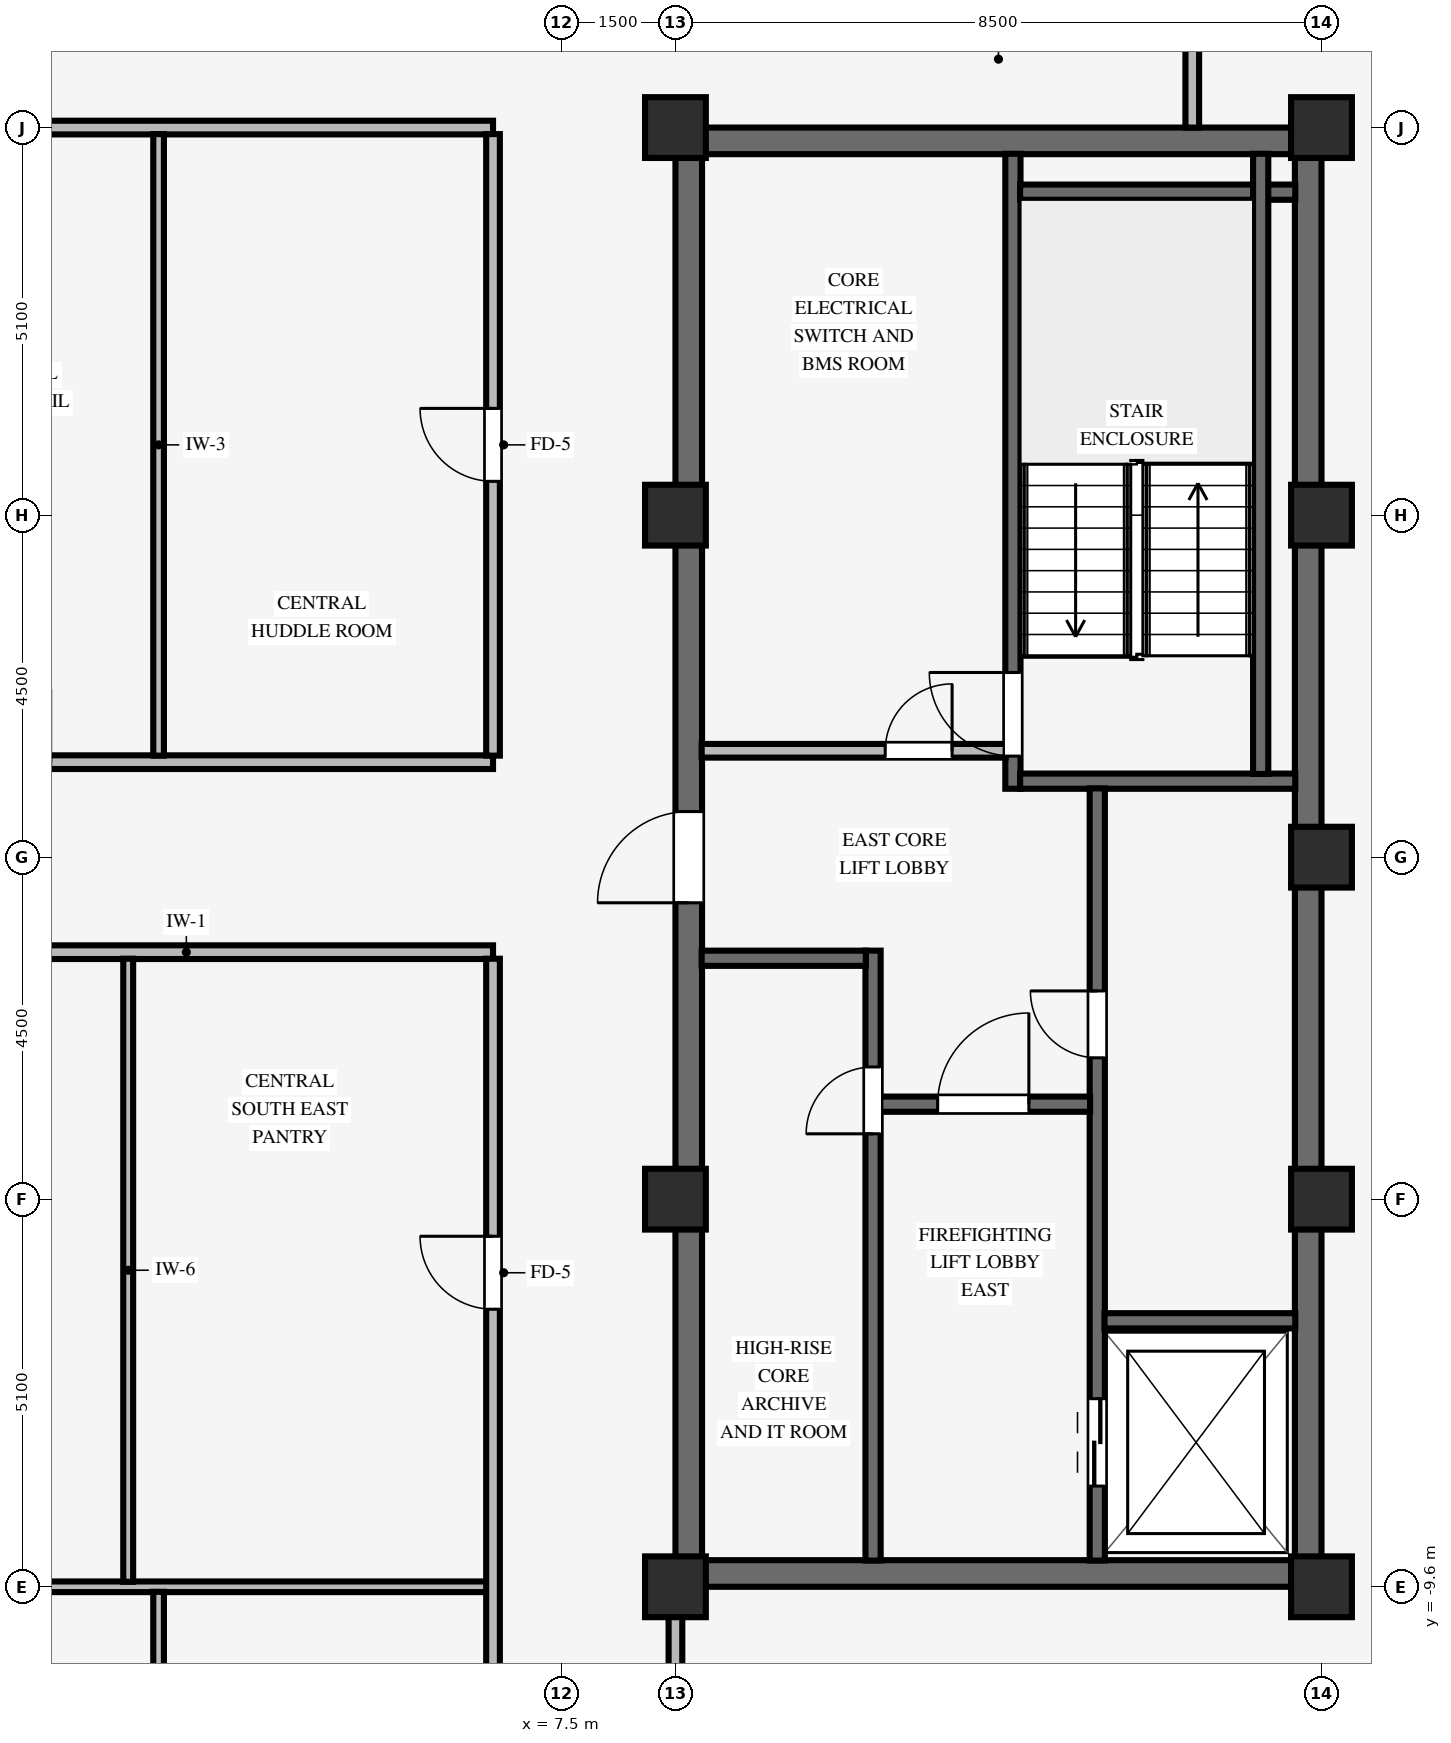
"""IFC4 building model, lengths in metres.
Left out: names, types, materials, properties, quantities, classifications, styles, units other than length and angle.
Written with IfcOpenShell. Run it as: python <this file> out.ifc"""

import sys

from ifc_helpers import new_model, si_unit, direction, frame, frame_2d, origin, origin_2d, place, context, subcontext, project, spatial, rectangle, extrude, source, transform, mapped, element, fill, save


model = new_model("IFC4")
c1 = context("Model", 3, precision=1e-05, world=origin(), true_north=direction((0.0, 1.0)))
c2 = subcontext(c1, "Body", "Model", "MODEL_VIEW")
j1 = project(units=[si_unit("LENGTHUNIT", "METRE"), si_unit("PLANEANGLEUNIT", "RADIAN")], contexts=[c1])
p1 = place(None, origin())
s1 = spatial("IfcSite", under=j1, at=p1, CompositionType="ELEMENT")
p2 = place(p1, origin())
s2 = spatial("IfcBuilding", under=s1, at=p2, CompositionType="ELEMENT")
p3 = place(p2, frame((0.0, 0.0, 268.9)))
s3 = spatial("IfcBuildingStorey", under=s2, at=p3, CompositionType="ELEMENT", Elevation=268.9)
for number, where, z_axis, x_axis in (
    (1, (9.0, -9.425, 0.0), (0.0, 0.0, 1.0), (1.0, 0.0, 0.0)),
    (2, (9.0, 9.425, 0.0), (0.0, 0.0, 1.0), (1.0, 0.0, 0.0)),
):
    element("IfcWall", number, at=place(p3, frame(where, z_axis=z_axis, x_axis=x_axis)), inside=s3, PredefinedType="SHEAR", context=c2, shape_type="SweptSolid", body=[
        extrude(rectangle(XDim=8.5, YDim=0.35, at=frame_2d((4.25, 0.0))), origin(), (0.0, 0.0, 1.0), 3.37),
    ])
p4 = place(p3, frame((9.175, -9.255, 0.0), z_axis=(0.0, 0.0, 1.0), x_axis=(0.0, 1.0, 0.0)))
e3 = element("IfcWall", 3, at=p4, inside=s3, PredefinedType="SHEAR", context=c2, shape_type="SweptSolid", body=[
    extrude(rectangle(XDim=18.51, YDim=0.35, at=frame_2d((9.255, 0.0))), origin(), (0.0, 0.0, 1.0), 3.37),
])
p5 = place(p4, frame((8.655, 0.0, 0.0)))
e4 = element("IfcOpeningElement", 4, at=p5, cuts=e3, PredefinedType="OPENING", context=c2, shape_type="SweptSolid", body=[
    extrude(rectangle(XDim=1.2, YDim=2.15, at=frame_2d((0.6, 1.075))), frame((0.0, 0.185, 0.0), z_axis=(0.0, -1.0, 0.0), x_axis=(1.0, 0.0, 0.0)), (0.0, 0.0, 1.0), 0.37),
])
p6 = place(p3, frame((17.325, -9.255, 0.0), z_axis=(0.0, 0.0, 1.0), x_axis=(0.0, 1.0, 0.0)))
e5 = element("IfcWall", 5, at=p6, inside=s3, PredefinedType="SHEAR", context=c2, shape_type="SweptSolid", body=[
    extrude(rectangle(XDim=18.51, YDim=0.35, at=frame_2d((9.255, 0.0))), origin(), (0.0, 0.0, 1.0), 3.37),
])
for number, where, z_axis, x_axis in (
    (6, (9.0, -9.6, 0.0), (0.0, 0.0, 1.0), (1.0, 0.0, 0.0)),
    (7, (9.0, -4.5, 0.0), (0.0, 0.0, 1.0), (1.0, 0.0, 0.0)),
    (8, (9.0, 4.5, 0.0), (0.0, 0.0, 1.0), (1.0, 0.0, 0.0)),
    (9, (9.0, 9.6, 0.0), (0.0, 0.0, 1.0), (1.0, 0.0, 0.0)),
    (10, (17.5, -9.6, 0.0), (0.0, 0.0, 1.0), (1.0, 0.0, 0.0)),
    (11, (17.5, -4.5, 0.0), (0.0, 0.0, 1.0), (1.0, 0.0, 0.0)),
    (12, (17.5, 4.5, 0.0), (0.0, 0.0, 1.0), (1.0, 0.0, 0.0)),
    (13, (17.5, 9.6, 0.0), (0.0, 0.0, 1.0), (1.0, 0.0, 0.0)),
    (14, (17.5, 0.0, 0.0), (0.0, 0.0, 1.0), (1.0, 0.0, 0.0)),
):
    element("IfcColumn", number, at=place(p3, frame(where, z_axis=z_axis, x_axis=x_axis)), inside=s3, PredefinedType="COLUMN", context=c2, shape_type="SweptSolid", body=[
        extrude(rectangle(XDim=0.8, YDim=0.8, at=origin_2d()), origin(), (0.0, 0.0, 1.0), 3.37),
    ])
p7 = place(p3, frame((13.44, 0.9, 0.0), z_axis=(0.0, 0.0, 1.0), x_axis=(0.0, 1.0, 0.0)))
e15 = element("IfcWall", 15, at=p7, inside=s3, PredefinedType="SHEAR", context=c2, shape_type="SweptSolid", body=[
    extrude(rectangle(XDim=8.355, YDim=0.2, at=frame_2d((4.177, 0.0))), origin(), (0.0, 0.0, 1.0), 3.37),
])
p8 = place(p7, frame((0.43, 0.0, 0.0)))
e16 = element("IfcOpeningElement", 16, at=p8, cuts=e15, PredefinedType="OPENING", context=c2, shape_type="SweptSolid", body=[
    extrude(rectangle(XDim=1.1, YDim=2.15, at=frame_2d((0.55, 1.075))), frame((0.0, 0.11, 0.0), z_axis=(0.0, -1.0, 0.0), x_axis=(1.0, 0.0, 0.0)), (0.0, 0.0, 1.0), 0.22),
])
for number, where, z_axis, x_axis in (
    (17, (13.535, 1.0, 0.0), (0.0, 0.0, 1.0), (1.0, 0.0, 0.0)),
    (18, (13.535, 8.75, 0.0), (0.0, 0.0, 1.0), (1.0, 0.0, 0.0)),
):
    element("IfcWall", number, at=place(p3, frame(where, z_axis=z_axis, x_axis=x_axis)), inside=s3, PredefinedType="SHEAR", context=c2, shape_type="SweptSolid", body=[
        extrude(rectangle(XDim=3.62, YDim=0.2, at=frame_2d((1.81, 0.0))), origin(), (0.0, 0.0, 1.0), 3.37),
    ])
p9 = place(p3, frame((16.7, 1.095, 0.0), z_axis=(0.0, 0.0, 1.0), x_axis=(0.0, 1.0, 0.0)))
e19 = element("IfcWall", 19, at=p9, inside=s3, PredefinedType="SHEAR", context=c2, shape_type="SweptSolid", body=[
    extrude(rectangle(XDim=8.16, YDim=0.2, at=frame_2d((4.08, 0.0))), origin(), (0.0, 0.0, 1.0), 3.37),
])
p10 = place(p3, frame((14.55, -9.255, 0.0), z_axis=(0.0, 0.0, 1.0), x_axis=(0.0, 1.0, 0.0)))
e20 = element("IfcWall", 20, at=p10, inside=s3, PredefinedType="SHEAR", context=c2, shape_type="SweptSolid", body=[
    extrude(rectangle(XDim=10.16, YDim=0.2, at=frame_2d((5.08, 0.0))), origin(), (0.0, 0.0, 1.0), 3.37),
])
p11 = place(p10, frame((6.615, 0.0, 0.0)))
e21 = element("IfcOpeningElement", 21, at=p11, cuts=e20, PredefinedType="OPENING", context=c2, shape_type="SweptSolid", body=[
    extrude(rectangle(XDim=0.88, YDim=2.1, at=frame_2d((0.44, 1.05))), frame((0.0, 0.11, 0.0), z_axis=(0.0, -1.0, 0.0), x_axis=(1.0, 0.0, 0.0)), (0.0, 0.0, 1.0), 0.22),
])
p12 = place(p10, frame((0.98, 0.0, 0.0)))
e22 = element("IfcOpeningElement", 22, at=p12, cuts=e20, PredefinedType="OPENING", context=c2, shape_type="SweptSolid", body=[
    extrude(rectangle(XDim=1.15, YDim=2.15, at=frame_2d((0.575, 1.075))), frame((0.0, 0.11, 0.0), z_axis=(0.0, -1.0, 0.0), x_axis=(1.0, 0.0, 0.0)), (0.0, 0.0, 1.0), 0.22),
])
p13 = place(p3, frame((14.645, -6.1, 0.0), z_axis=(0.0, 0.0, 1.0), x_axis=(1.0, 0.0, 0.0)))
e23 = element("IfcWall", 23, at=p13, inside=s3, PredefinedType="SHEAR", context=c2, shape_type="SweptSolid", body=[
    extrude(rectangle(XDim=2.51, YDim=0.2, at=frame_2d((1.255, 0.0))), origin(), (0.0, 0.0, 1.0), 3.37),
])
p14 = place(p3, frame((11.6, -9.255, 0.0), z_axis=(0.0, 0.0, 1.0), x_axis=(0.0, 1.0, 0.0)))
e24 = element("IfcWall", 24, at=p14, inside=s3, PredefinedType="SHEAR", context=c2, shape_type="SweptSolid", body=[
    extrude(rectangle(XDim=8.025, YDim=0.2, at=frame_2d((4.012, 0.0))), origin(), (0.0, 0.0, 1.0), 3.37),
])
p15 = place(p14, frame((5.615, 0.0, 0.0)))
e25 = element("IfcOpeningElement", 25, at=p15, cuts=e24, PredefinedType="OPENING", context=c2, shape_type="SweptSolid", body=[
    extrude(rectangle(XDim=0.88, YDim=2.1, at=frame_2d((0.44, 1.05))), frame((0.0, 0.11, 0.0), z_axis=(0.0, -1.0, 0.0), x_axis=(1.0, 0.0, 0.0)), (0.0, 0.0, 1.0), 0.22),
])
p16 = place(p3, frame((11.695, -3.25, 0.0), z_axis=(0.0, 0.0, 1.0), x_axis=(1.0, 0.0, 0.0)))
e26 = element("IfcWall", 26, at=p16, inside=s3, PredefinedType="SHEAR", context=c2, shape_type="SweptSolid", body=[
    extrude(rectangle(XDim=2.76, YDim=0.2, at=frame_2d((1.38, 0.0))), origin(), (0.0, 0.0, 1.0), 3.37),
])
p17 = place(p16, frame((0.755, 0.0, 0.0)))
e27 = element("IfcOpeningElement", 27, at=p17, cuts=e26, PredefinedType="OPENING", context=c2, shape_type="SweptSolid", body=[
    extrude(rectangle(XDim=1.2, YDim=2.15, at=frame_2d((0.6, 1.075))), frame((0.0, 0.11, 0.0), z_axis=(0.0, -1.0, 0.0), x_axis=(1.0, 0.0, 0.0)), (0.0, 0.0, 1.0), 0.22),
])
p18 = place(p3, frame((9.345, -1.33, 0.0), z_axis=(0.0, 0.0, 1.0), x_axis=(1.0, 0.0, 0.0)))
e28 = element("IfcWall", 28, at=p18, inside=s3, PredefinedType="SHEAR", context=c2, shape_type="SweptSolid", body=[
    extrude(rectangle(XDim=2.16, YDim=0.2, at=frame_2d((1.08, 0.0))), origin(), (0.0, 0.0, 1.0), 3.37),
])
p19 = place(p3, frame((9.345, 1.4, 0.0), z_axis=(0.0, 0.0, 1.0), x_axis=(1.0, 0.0, 0.0)))
e29 = element("IfcWall", 29, at=p19, inside=s3, PredefinedType="PARTITIONING", context=c2, shape_type="SweptSolid", body=[
    extrude(rectangle(XDim=4.0, YDim=0.18, at=frame_2d((2.0, 0.0))), origin(), (0.0, 0.0, 1.0), 3.36),
])
p20 = place(p19, frame((2.415, 0.0, 0.0)))
e30 = element("IfcOpeningElement", 30, at=p20, cuts=e29, PredefinedType="OPENING", context=c2, shape_type="SweptSolid", body=[
    extrude(rectangle(XDim=0.88, YDim=2.1, at=frame_2d((0.44, 1.05))), frame((0.0, 0.1, 0.0), z_axis=(0.0, -1.0, 0.0), x_axis=(1.0, 0.0, 0.0)), (0.0, 0.0, 1.0), 0.2),
])
p21 = place(p3, frame((0.151, -9.6, 0.0), z_axis=(0.0, 0.0, 1.0), x_axis=(1.0, 0.0, 0.0)))
e31 = element("IfcWall", 31, at=p21, inside=s3, PredefinedType="PARTITIONING", context=c2, shape_type="SweptSolid", body=[
    extrude(rectangle(XDim=6.388, YDim=0.14, at=frame_2d((3.194, 0.0))), origin(), (0.0, 0.0, 1.0), 2.405),
])
p22 = place(p3, frame((-6.6, -1.25, 0.0), z_axis=(0.0, 0.0, 1.0), x_axis=(1.0, 0.0, 0.0)))
e32 = element("IfcWall", 32, at=p22, inside=s3, PredefinedType="PARTITIONING", context=c2, shape_type="SweptSolid", body=[
    extrude(rectangle(XDim=13.2, YDim=0.18, at=frame_2d((6.6, 0.0))), origin(), (0.0, 0.0, 1.0), 3.36),
])
p23 = place(p22, frame((3.72, 0.0, 0.0)))
e33 = element("IfcOpeningElement", 33, at=p23, cuts=e32, PredefinedType="OPENING", context=c2, shape_type="SweptSolid", body=[
    extrude(rectangle(XDim=0.96, YDim=2.1, at=frame_2d((0.48, 1.05))), frame((0.0, 0.1, 0.0), z_axis=(0.0, -1.0, 0.0), x_axis=(1.0, 0.0, 0.0)), (0.0, 0.0, 1.0), 0.2),
])
p24 = place(p3, frame((-6.6, 1.25, 0.0), z_axis=(0.0, 0.0, 1.0), x_axis=(1.0, 0.0, 0.0)))
e34 = element("IfcWall", 34, at=p24, inside=s3, PredefinedType="PARTITIONING", context=c2, shape_type="SweptSolid", body=[
    extrude(rectangle(XDim=13.2, YDim=0.18, at=frame_2d((6.6, 0.0))), origin(), (0.0, 0.0, 1.0), 3.36),
])
p25 = place(p24, frame((6.42, 0.0, 0.0)))
e35 = element("IfcOpeningElement", 35, at=p25, cuts=e34, PredefinedType="OPENING", context=c2, shape_type="SweptSolid", body=[
    extrude(rectangle(XDim=0.96, YDim=2.1, at=frame_2d((0.48, 1.05))), frame((0.0, 0.1, 0.0), z_axis=(0.0, -1.0, 0.0), x_axis=(1.0, 0.0, 0.0)), (0.0, 0.0, 1.0), 0.2),
])
p26 = place(p3, frame((0.151, 9.6, 0.0), z_axis=(0.0, 0.0, 1.0), x_axis=(1.0, 0.0, 0.0)))
e36 = element("IfcWall", 36, at=p26, inside=s3, PredefinedType="PARTITIONING", context=c2, shape_type="SweptSolid", body=[
    extrude(rectangle(XDim=6.449, YDim=0.18, at=frame_2d((3.225, 0.0))), origin(), (0.0, 0.0, 1.0), 2.405),
])
p27 = place(p3, frame((1.8, -9.534, 0.0), z_axis=(0.0, 0.0, 1.0), x_axis=(0.0, 1.0, 0.0)))
e37 = element("IfcWall", 37, at=p27, inside=s3, PredefinedType="PARTITIONING", context=c2, shape_type="SweptSolid", body=[
    extrude(rectangle(XDim=8.198, YDim=0.13, at=frame_2d((4.099, 0.0))), origin(), (0.0, 0.0, 1.0), 3.36),
])
p28 = place(p3, frame((2.2, -19.1, 0.0), z_axis=(0.0, 0.0, 1.0), x_axis=(0.0, 1.0, 0.0)))
e38 = element("IfcWall", 38, at=p28, inside=s3, PredefinedType="PARTITIONING", context=c2, shape_type="SweptSolid", body=[
    extrude(rectangle(XDim=9.434, YDim=0.14, at=frame_2d((4.717, 0.0))), origin(), (0.0, 0.0, 1.0), 3.36),
])
p29 = place(p28, frame((4.247, 0.0, 0.0)))
e39 = element("IfcOpeningElement", 39, at=p29, cuts=e38, PredefinedType="OPENING", context=c2, shape_type="SweptSolid", body=[
    extrude(rectangle(XDim=0.94, YDim=2.1, at=frame_2d((0.47, 1.05))), frame((0.0, 0.08, 0.0), z_axis=(0.0, -1.0, 0.0), x_axis=(1.0, 0.0, 0.0)), (0.0, 0.0, 1.0), 0.16),
])
p30 = place(p3, frame((2.2, 1.336, 0.0), z_axis=(0.0, 0.0, 1.0), x_axis=(0.0, 1.0, 0.0)))
e40 = element("IfcWall", 40, at=p30, inside=s3, PredefinedType="PARTITIONING", context=c2, shape_type="SweptSolid", body=[
    extrude(rectangle(XDim=8.178, YDim=0.14, at=frame_2d((4.089, 0.0))), origin(), (0.0, 0.0, 1.0), 3.36),
])
p31 = place(p3, frame((6.6, -19.1, 0.0), z_axis=(0.0, 0.0, 1.0), x_axis=(0.0, 1.0, 0.0)))
e41 = element("IfcWall", 41, at=p31, inside=s3, PredefinedType="PARTITIONING", context=c2, shape_type="SweptSolid", body=[
    extrude(rectangle(XDim=17.764, YDim=0.18, at=frame_2d((8.882, 0.0))), origin(), (0.0, 0.0, 1.0), 3.36),
])
p32 = place(p31, frame((13.152, 0.0, 0.0)))
e42 = element("IfcOpeningElement", 42, at=p32, cuts=e41, PredefinedType="OPENING", context=c2, shape_type="SweptSolid", body=[
    extrude(rectangle(XDim=0.96, YDim=2.1, at=frame_2d((0.48, 1.05))), frame((0.0, 0.1, 0.0), z_axis=(0.0, -1.0, 0.0), x_axis=(1.0, 0.0, 0.0)), (0.0, 0.0, 1.0), 0.2),
])
p33 = place(p31, frame((6.12, 0.0, 0.0)))
e43 = element("IfcOpeningElement", 43, at=p33, cuts=e41, PredefinedType="OPENING", context=c2, shape_type="SweptSolid", body=[
    extrude(rectangle(XDim=0.96, YDim=2.1, at=frame_2d((0.48, 1.05))), frame((0.0, 0.1, 0.0), z_axis=(0.0, -1.0, 0.0), x_axis=(1.0, 0.0, 0.0)), (0.0, 0.0, 1.0), 0.2),
])
p34 = place(p3, frame((6.6, 1.336, 0.0), z_axis=(0.0, 0.0, 1.0), x_axis=(0.0, 1.0, 0.0)))
e44 = element("IfcWall", 44, at=p34, inside=s3, PredefinedType="PARTITIONING", context=c2, shape_type="SweptSolid", body=[
    extrude(rectangle(XDim=8.178, YDim=0.18, at=frame_2d((4.089, 0.0))), origin(), (0.0, 0.0, 1.0), 3.36),
])
p35 = place(p34, frame((3.609, 0.0, 0.0)))
e45 = element("IfcOpeningElement", 45, at=p35, cuts=e44, PredefinedType="OPENING", context=c2, shape_type="SweptSolid", body=[
    extrude(rectangle(XDim=0.96, YDim=2.1, at=frame_2d((0.48, 1.05))), frame((0.0, 0.1, 0.0), z_axis=(0.0, -1.0, 0.0), x_axis=(1.0, 0.0, 0.0)), (0.0, 0.0, 1.0), 0.2),
])
p36 = place(p3, frame((9.0, -15.314, 0.0), z_axis=(0.0, 0.0, 1.0), x_axis=(0.0, 1.0, 0.0)))
e46 = element("IfcWall", 46, at=p36, inside=s3, PredefinedType="PARTITIONING", context=c2, shape_type="SweptSolid", body=[
    extrude(rectangle(XDim=5.318, YDim=0.18, at=frame_2d((2.659, 0.0))), origin(), (0.0, 0.0, 1.0), 2.892),
])
p37 = place(p36, frame((2.179, 0.0, 0.0)))
e47 = element("IfcOpeningElement", 47, at=p37, cuts=e46, PredefinedType="OPENING", context=c2, shape_type="SweptSolid", body=[
    extrude(rectangle(XDim=0.96, YDim=2.1, at=frame_2d((0.48, 1.05))), frame((0.0, 0.1, 0.0), z_axis=(0.0, -1.0, 0.0), x_axis=(1.0, 0.0, 0.0)), (0.0, 0.0, 1.0), 0.2),
])
p38 = place(p3, frame((15.8, 9.6, 0.0), z_axis=(0.0, 0.0, 1.0), x_axis=(0.0, 1.0, 0.0)))
e48 = element("IfcWall", 48, at=p38, inside=s3, PredefinedType="PARTITIONING", context=c2, shape_type="SweptSolid", body=[
    extrude(rectangle(XDim=2.514, YDim=0.18, at=frame_2d((1.257, 0.0))), origin(), (0.0, 0.0, 1.0), 3.36),
])
m1 = source(origin(), c2, "Body", "SweptSolid", [
    extrude(rectangle(XDim=1.1, YDim=2.15, at=frame_2d((0.55, 1.075))), frame((0.0, 0.025, 0.0), z_axis=(0.0, -1.0, 0.0), x_axis=(1.0, 0.0, 0.0)), (0.0, 0.0, 1.0), 0.05),
])
p39 = place(p8, origin())
e49 = element("IfcDoor", 49, at=p39, inside=s3, OperationType="SINGLE_SWING_RIGHT", PredefinedType="DOOR", context=c2, shape_type="MappedRepresentation", body=[
    mapped(m1, transform((0.0, 0.0, 0.0), scale=1.0)),
])
fill(e16, e49)
m2 = source(origin(), c2, "Body", "SweptSolid", [
    extrude(rectangle(XDim=0.88, YDim=2.1, at=frame_2d((0.44, 1.05))), frame((0.0, 0.025, 0.0), z_axis=(0.0, -1.0, 0.0), x_axis=(1.0, 0.0, 0.0)), (0.0, 0.0, 1.0), 0.05),
])
p40 = place(p11, origin())
e50 = element("IfcDoor", 50, at=p40, inside=s3, OperationType="SINGLE_SWING_RIGHT", PredefinedType="DOOR", context=c2, shape_type="MappedRepresentation", body=[
    mapped(m2, transform((0.0, 0.0, 0.0), scale=1.0)),
])
fill(e21, e50)
m3 = source(origin(), c2, "Body", "SweptSolid", [
    extrude(rectangle(XDim=1.2, YDim=2.15, at=frame_2d((0.6, 1.075))), frame((0.0, 0.025, 0.0), z_axis=(0.0, -1.0, 0.0), x_axis=(1.0, 0.0, 0.0)), (0.0, 0.0, 1.0), 0.05),
])
p41 = place(p17, origin())
e51 = element("IfcDoor", 51, at=p41, inside=s3, OperationType="SINGLE_SWING_RIGHT", PredefinedType="DOOR", context=c2, shape_type="MappedRepresentation", body=[
    mapped(m3, transform((0.0, 0.0, 0.0), scale=1.0)),
])
fill(e27, e51)
p42 = place(p15, origin())
e52 = element("IfcDoor", 52, at=p42, inside=s3, OperationType="SINGLE_SWING_LEFT", PredefinedType="DOOR", context=c2, shape_type="MappedRepresentation", body=[
    mapped(m2, transform((0.0, 0.0, 0.0), scale=1.0)),
])
fill(e25, e52)
p43 = place(p5, origin())
e53 = element("IfcDoor", 53, at=p43, inside=s3, OperationType="SINGLE_SWING_LEFT", PredefinedType="DOOR", context=c2, shape_type="MappedRepresentation", body=[
    mapped(m3, transform((0.0, 0.0, 0.0), scale=1.0)),
])
fill(e4, e53)
p44 = place(p20, origin())
e54 = element("IfcDoor", 54, at=p44, inside=s3, OperationType="SINGLE_SWING_RIGHT", PredefinedType="DOOR", context=c2, shape_type="MappedRepresentation", body=[
    mapped(m2, transform((0.0, 0.0, 0.0), scale=1.0)),
])
fill(e30, e54)
m4 = source(origin(), c2, "Body", "SweptSolid", [
    extrude(rectangle(XDim=1.15, YDim=2.15, at=frame_2d((0.575, 1.075))), frame((0.0, 0.025, 0.0), z_axis=(0.0, -1.0, 0.0), x_axis=(1.0, 0.0, 0.0)), (0.0, 0.0, 1.0), 0.05),
])
p45 = place(p12, origin())
e55 = element("IfcDoor", 55, at=p45, inside=s3, OperationType="DOUBLE_DOOR_SLIDING", PredefinedType="DOOR", context=c2, shape_type="MappedRepresentation", body=[
    mapped(m4, transform((0.0, 0.0, 0.0), scale=1.0)),
])
fill(e22, e55)
m5 = source(origin(), c2, "Body", "SweptSolid", [
    extrude(rectangle(XDim=0.96, YDim=2.1, at=frame_2d((0.48, 1.05))), frame((0.0, 0.025, 0.0), z_axis=(0.0, -1.0, 0.0), x_axis=(1.0, 0.0, 0.0)), (0.0, 0.0, 1.0), 0.05),
])
p46 = place(p32, origin())
e56 = element("IfcDoor", 56, at=p46, inside=s3, OperationType="SINGLE_SWING_RIGHT", PredefinedType="DOOR", context=c2, shape_type="MappedRepresentation", body=[
    mapped(m5, transform((0.0, 0.0, 0.0), scale=1.0)),
])
fill(e42, e56)
p47 = place(p35, origin())
e57 = element("IfcDoor", 57, at=p47, inside=s3, OperationType="SINGLE_SWING_RIGHT", PredefinedType="DOOR", context=c2, shape_type="MappedRepresentation", body=[
    mapped(m5, transform((0.0, 0.0, 0.0), scale=1.0)),
])
fill(e45, e57)
save(model, sys.argv[1])
